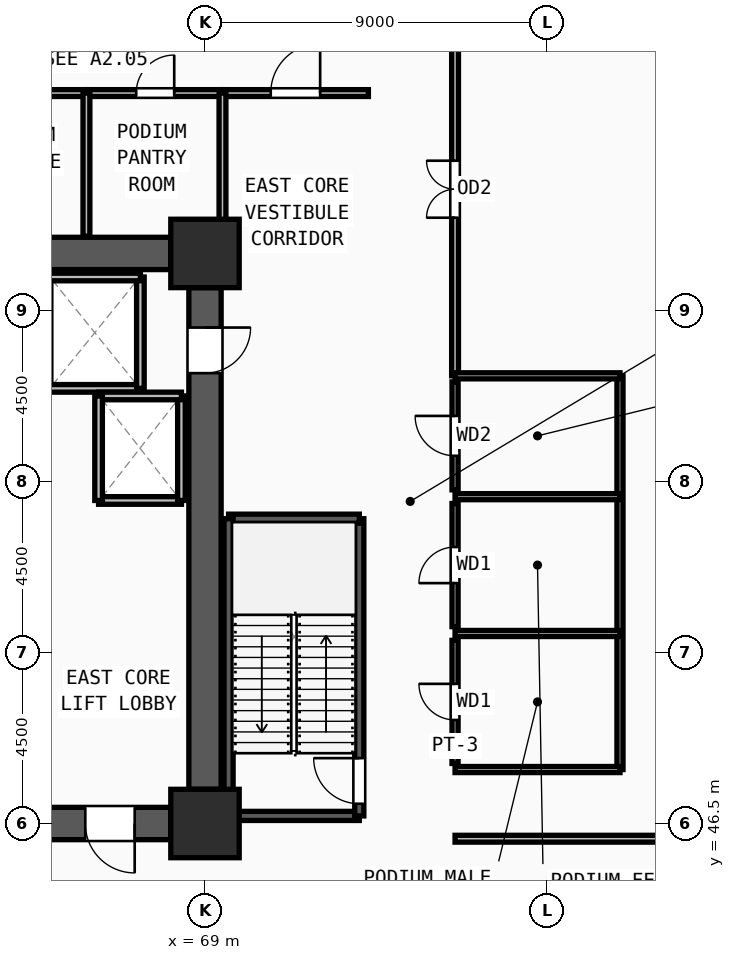
"""IFC4 building model, lengths in metres.
Left out: names, types, materials, properties, quantities, classifications, styles, units other than length and angle.
Written with IfcOpenShell. Run it as: python <this file> out.ifc"""

import sys

from ifc_helpers import new_model, si_unit, direction, frame, frame_2d, origin, origin_2d, place, context, subcontext, project, spatial, rectangle, extrude, source, transform, mapped, element, fill, save


model = new_model("IFC4")
c1 = context("Model", 3, precision=1e-05, world=origin(), true_north=direction((0.0, 1.0)))
c2 = subcontext(c1, "Body", "Model", "MODEL_VIEW")
j1 = project(units=[si_unit("LENGTHUNIT", "METRE"), si_unit("PLANEANGLEUNIT", "RADIAN")], contexts=[c1])
p1 = place(None, origin())
s1 = spatial("IfcSite", under=j1, at=p1, CompositionType="ELEMENT")
p2 = place(p1, origin())
s2 = spatial("IfcBuilding", under=s1, at=p2, CompositionType="ELEMENT")
p3 = place(p2, frame((0.0, 0.0, 18.9)))
s3 = spatial("IfcBuildingStorey", under=s2, at=p3, CompositionType="ELEMENT", Elevation=18.9)
m1 = source(origin(), c2, "Body", "SweptSolid", [
    extrude(rectangle(XDim=1.8, YDim=1.8, at=origin_2d()), origin(), (0.0, 0.0, 1.0), 4.5),
])
for number, where, z_axis, x_axis in (
    (1, (69.0, 46.5, 0.0), (0.0, 0.0, 1.0), (1.0, 0.0, 0.0)),
    (2, (69.0, 61.5, 0.0), (0.0, 0.0, 1.0), (1.0, 0.0, 0.0)),
):
    element("IfcColumn", number, at=place(p3, frame(where, z_axis=z_axis, x_axis=x_axis)), inside=s3, PredefinedType="COLUMN", context=c2, shape_type="MappedRepresentation", body=[
        mapped(m1, transform((0.0, 0.0, 0.0), x_axis=(1.0, 0.0, 0.0), y_axis=(0.0, 1.0, 0.0), z_axis=(0.0, 0.0, 1.0), scale=1.0)),
    ])
p4 = place(p3, frame((60.9, 61.5, 0.0), z_axis=(0.0, 0.0, 1.0), x_axis=(1.0, 0.0, 0.0)))
e3 = element("IfcWall", 3, at=p4, inside=s3, PredefinedType="SHEAR", context=c2, shape_type="SweptSolid", body=[
    extrude(rectangle(XDim=7.2, YDim=0.85, at=frame_2d((3.6, 0.0))), origin(), (0.0, 0.0, 1.0), 3.6),
])
p5 = place(p3, frame((69.0, 60.6, 0.0), z_axis=(0.0, 0.0, 1.0), x_axis=(0.0, -1.0, 0.0)))
e4 = element("IfcWall", 4, at=p5, inside=s3, PredefinedType="SHEAR", context=c2, shape_type="SweptSolid", body=[
    extrude(rectangle(XDim=13.2, YDim=0.85, at=frame_2d((6.6, 0.0))), origin(), (0.0, 0.0, 1.0), 3.6),
])
m2 = source(origin(), c2, "Body", "SweptSolid", [
    extrude(rectangle(XDim=1.2, YDim=2.2, at=frame_2d((0.6, 1.1))), frame((0.0, 0.435, 0.0), z_axis=(0.0, -1.0, 0.0), x_axis=(1.0, 0.0, 0.0)), (0.0, 0.0, 1.0), 0.87),
])
p6 = place(p5, frame((1.05, 0.0, 0.0)))
e5 = element("IfcOpeningElement", 5, at=p6, cuts=e4, PredefinedType="OPENING", context=c2, shape_type="MappedRepresentation", body=[
    mapped(m2, transform((0.0, 0.0, 0.0), x_axis=(1.0, 0.0, 0.0), y_axis=(0.0, 1.0, 0.0), z_axis=(0.0, 0.0, 1.0), scale=1.0)),
])
p7 = place(p3, frame((68.1, 46.5, 0.0), z_axis=(0.0, 0.0, 1.0), x_axis=(-1.0, 0.0, 0.0)))
e6 = element("IfcWall", 6, at=p7, inside=s3, PredefinedType="SHEAR", context=c2, shape_type="SweptSolid", body=[
    extrude(rectangle(XDim=7.2, YDim=0.85, at=frame_2d((3.6, 0.0))), origin(), (0.0, 0.0, 1.0), 3.6),
])
m3 = source(origin(), c2, "Body", "SweptSolid", [
    extrude(rectangle(XDim=1.3, YDim=2.2, at=frame_2d((0.65, 1.1))), frame((0.0, 0.435, 0.0), z_axis=(0.0, -1.0, 0.0), x_axis=(1.0, 0.0, 0.0)), (0.0, 0.0, 1.0), 0.87),
])
p8 = place(p7, frame((0.95, 0.0, 0.0)))
e7 = element("IfcOpeningElement", 7, at=p8, cuts=e6, PredefinedType="OPENING", context=c2, shape_type="MappedRepresentation", body=[
    mapped(m3, transform((0.0, 0.0, 0.0), x_axis=(1.0, 0.0, 0.0), y_axis=(0.0, 1.0, 0.0), z_axis=(0.0, 0.0, 1.0), scale=1.0)),
])
p9 = place(p3, frame((69.62, 46.7, 0.0), z_axis=(0.0, 0.0, 1.0), x_axis=(1.0, 0.0, 0.0)))
e8 = element("IfcWall", 8, at=p9, inside=s3, PredefinedType="SOLIDWALL", context=c2, shape_type="SweptSolid", body=[
    extrude(rectangle(XDim=3.44, YDim=0.24, at=frame_2d((1.72, 0.0))), origin(), (0.0, 0.0, 1.0), 3.6),
])
p10 = place(p3, frame((73.06, 46.7, 0.0), z_axis=(0.0, 0.0, 1.0), x_axis=(0.0, 1.0, 0.0)))
e9 = element("IfcWall", 9, at=p10, inside=s3, PredefinedType="SOLIDWALL", context=c2, shape_type="SweptSolid", body=[
    extrude(rectangle(XDim=7.82, YDim=0.24, at=frame_2d((3.91, 0.0))), origin(), (0.0, 0.0, 1.0), 3.6),
])
m4 = source(origin(), c2, "Body", "SweptSolid", [
    extrude(rectangle(XDim=1.2, YDim=2.2, at=frame_2d((0.6, 1.1))), frame((0.0, 0.13, 0.0), z_axis=(0.0, -1.0, 0.0), x_axis=(1.0, 0.0, 0.0)), (0.0, 0.0, 1.0), 0.26),
])
p11 = place(p10, frame((0.32, 0.0, 0.0)))
e10 = element("IfcOpeningElement", 10, at=p11, cuts=e9, PredefinedType="OPENING", context=c2, shape_type="MappedRepresentation", body=[
    mapped(m4, transform((0.0, 0.0, 0.0), x_axis=(1.0, 0.0, 0.0), y_axis=(0.0, 1.0, 0.0), z_axis=(0.0, 0.0, 1.0), scale=1.0)),
])
p12 = place(p3, frame((73.06, 54.52, 0.0), z_axis=(0.0, 0.0, 1.0), x_axis=(-1.0, 0.0, 0.0)))
e11 = element("IfcWall", 11, at=p12, inside=s3, PredefinedType="SOLIDWALL", context=c2, shape_type="SweptSolid", body=[
    extrude(rectangle(XDim=3.44, YDim=0.24, at=frame_2d((1.72, 0.0))), origin(), (0.0, 0.0, 1.0), 3.6),
])
p13 = place(p3, frame((69.62, 54.52, 0.0), z_axis=(0.0, 0.0, 1.0), x_axis=(0.0, -1.0, 0.0)))
e12 = element("IfcWall", 12, at=p13, inside=s3, PredefinedType="SOLIDWALL", context=c2, shape_type="SweptSolid", body=[
    extrude(rectangle(XDim=7.82, YDim=0.24, at=frame_2d((3.91, 0.0))), origin(), (0.0, 0.0, 1.0), 3.6),
])
p14 = place(p3, frame((64.9, 57.95, 0.0), z_axis=(0.0, 0.0, 1.0), x_axis=(1.0, 0.0, 0.0)))
e13 = element("IfcWall", 13, at=p14, inside=s3, PredefinedType="SOLIDWALL", context=c2, shape_type="SweptSolid", body=[
    extrude(rectangle(XDim=2.4, YDim=0.2, at=frame_2d((1.2, 0.0))), origin(), (0.0, 0.0, 1.0), 3.6),
])
p15 = place(p3, frame((67.3, 57.95, 0.0), z_axis=(0.0, 0.0, 1.0), x_axis=(0.0, 1.0, 0.0)))
e14 = element("IfcWall", 14, at=p15, inside=s3, PredefinedType="SOLIDWALL", context=c2, shape_type="SweptSolid", body=[
    extrude(rectangle(XDim=2.93, YDim=0.2, at=frame_2d((1.465, 0.0))), origin(), (0.0, 0.0, 1.0), 3.6),
])
p16 = place(p3, frame((67.3, 60.88, 0.0), z_axis=(0.0, 0.0, 1.0), x_axis=(-1.0, 0.0, 0.0)))
e15 = element("IfcWall", 15, at=p16, inside=s3, PredefinedType="SOLIDWALL", context=c2, shape_type="SweptSolid", body=[
    extrude(rectangle(XDim=2.4, YDim=0.2, at=frame_2d((1.2, 0.0))), origin(), (0.0, 0.0, 1.0), 3.6),
])
p17 = place(p3, frame((66.2, 55.0, 0.0), z_axis=(0.0, 0.0, 1.0), x_axis=(1.0, 0.0, 0.0)))
e16 = element("IfcWall", 16, at=p17, inside=s3, PredefinedType="SOLIDWALL", context=c2, shape_type="SweptSolid", body=[
    extrude(rectangle(XDim=2.18, YDim=0.2, at=frame_2d((1.09, 0.0))), origin(), (0.0, 0.0, 1.0), 3.6),
])
p18 = place(p3, frame((68.38, 55.0, 0.0), z_axis=(0.0, 0.0, 1.0), x_axis=(0.0, 1.0, 0.0)))
e17 = element("IfcWall", 17, at=p18, inside=s3, PredefinedType="SOLIDWALL", context=c2, shape_type="SweptSolid", body=[
    extrude(rectangle(XDim=2.75, YDim=0.2, at=frame_2d((1.375, 0.0))), origin(), (0.0, 0.0, 1.0), 3.6),
])
p19 = place(p3, frame((68.38, 57.75, 0.0), z_axis=(0.0, 0.0, 1.0), x_axis=(-1.0, 0.0, 0.0)))
e18 = element("IfcWall", 18, at=p19, inside=s3, PredefinedType="SOLIDWALL", context=c2, shape_type="SweptSolid", body=[
    extrude(rectangle(XDim=2.18, YDim=0.2, at=frame_2d((1.09, 0.0))), origin(), (0.0, 0.0, 1.0), 3.6),
])
p20 = place(p3, frame((66.2, 57.75, 0.0), z_axis=(0.0, 0.0, 1.0), x_axis=(0.0, -1.0, 0.0)))
e19 = element("IfcWall", 19, at=p20, inside=s3, PredefinedType="SOLIDWALL", context=c2, shape_type="SweptSolid", body=[
    extrude(rectangle(XDim=2.75, YDim=0.2, at=frame_2d((1.375, 0.0))), origin(), (0.0, 0.0, 1.0), 3.6),
])
p21 = place(p3, frame((75.58, 48.08, 0.0), z_axis=(0.0, 0.0, 1.0), x_axis=(0.0, 1.0, 0.0)))
e20 = element("IfcWall", 20, at=p21, inside=s3, PredefinedType="PARTITIONING", context=c2, shape_type="SweptSolid", body=[
    extrude(rectangle(XDim=3.24, YDim=0.16, at=frame_2d((1.62, 0.0))), origin(), (0.0, 0.0, 1.0), 3.6),
])
m5 = source(origin(), c2, "Body", "SweptSolid", [
    extrude(rectangle(XDim=0.95, YDim=2.15, at=frame_2d((0.475, 1.075))), frame((0.0, 0.09, 0.0), z_axis=(0.0, -1.0, 0.0), x_axis=(1.0, 0.0, 0.0)), (0.0, 0.0, 1.0), 0.18),
])
p22 = place(p21, frame((1.145, 0.0, 0.0)))
e21 = element("IfcOpeningElement", 21, at=p22, cuts=e20, PredefinedType="OPENING", context=c2, shape_type="MappedRepresentation", body=[
    mapped(m5, transform((0.0, 0.0, 0.0), x_axis=(1.0, 0.0, 0.0), y_axis=(0.0, 1.0, 0.0), z_axis=(0.0, 0.0, 1.0), scale=1.0)),
])
p23 = place(p3, frame((75.58, 51.68, 0.0), z_axis=(0.0, 0.0, 1.0), x_axis=(0.0, 1.0, 0.0)))
e22 = element("IfcWall", 22, at=p23, inside=s3, PredefinedType="PARTITIONING", context=c2, shape_type="SweptSolid", body=[
    extrude(rectangle(XDim=3.24, YDim=0.16, at=frame_2d((1.62, 0.0))), origin(), (0.0, 0.0, 1.0), 3.6),
])
p24 = place(p23, frame((1.145, 0.0, 0.0)))
e23 = element("IfcOpeningElement", 23, at=p24, cuts=e22, PredefinedType="OPENING", context=c2, shape_type="MappedRepresentation", body=[
    mapped(m5, transform((0.0, 0.0, 0.0), x_axis=(1.0, 0.0, 0.0), y_axis=(0.0, 1.0, 0.0), z_axis=(0.0, 0.0, 1.0), scale=1.0)),
])
p25 = place(p3, frame((75.58, 55.28, 0.0), z_axis=(0.0, 0.0, 1.0), x_axis=(0.0, 1.0, 0.0)))
e24 = element("IfcWall", 24, at=p25, inside=s3, PredefinedType="PARTITIONING", context=c2, shape_type="SweptSolid", body=[
    extrude(rectangle(XDim=2.84, YDim=0.16, at=frame_2d((1.42, 0.0))), origin(), (0.0, 0.0, 1.0), 3.6),
])
m6 = source(origin(), c2, "Body", "SweptSolid", [
    extrude(rectangle(XDim=1.05, YDim=2.15, at=frame_2d((0.525, 1.075))), frame((0.0, 0.09, 0.0), z_axis=(0.0, -1.0, 0.0), x_axis=(1.0, 0.0, 0.0)), (0.0, 0.0, 1.0), 0.18),
])
p26 = place(p25, frame((0.895, 0.0, 0.0)))
e25 = element("IfcOpeningElement", 25, at=p26, cuts=e24, PredefinedType="OPENING", context=c2, shape_type="MappedRepresentation", body=[
    mapped(m6, transform((0.0, 0.0, 0.0), x_axis=(1.0, 0.0, 0.0), y_axis=(0.0, 1.0, 0.0), z_axis=(0.0, 0.0, 1.0), scale=1.0)),
])
p27 = place(p3, frame((62.39, 65.72, 0.0), z_axis=(0.0, 0.0, 1.0), x_axis=(1.0, 0.0, 0.0)))
e26 = element("IfcWall", 26, at=p27, inside=s3, PredefinedType="PARTITIONING", context=c2, shape_type="SweptSolid", body=[
    extrude(rectangle(XDim=3.49, YDim=0.18, at=frame_2d((1.745, 0.0))), origin(), (0.0, 0.0, 1.0), 3.6),
])
m7 = source(origin(), c2, "Body", "SweptSolid", [
    extrude(rectangle(XDim=1.0, YDim=2.2, at=frame_2d((0.5, 1.1))), frame((0.0, 0.1, 0.0), z_axis=(0.0, -1.0, 0.0), x_axis=(1.0, 0.0, 0.0)), (0.0, 0.0, 1.0), 0.2),
])
p28 = place(p27, frame((1.245, 0.0, 0.0)))
e27 = element("IfcOpeningElement", 27, at=p28, cuts=e26, PredefinedType="OPENING", context=c2, shape_type="MappedRepresentation", body=[
    mapped(m7, transform((0.0, 0.0, 0.0), x_axis=(1.0, 0.0, 0.0), y_axis=(0.0, 1.0, 0.0), z_axis=(0.0, 0.0, 1.0), scale=1.0)),
])
p29 = place(p3, frame((65.92, 65.72, 0.0), z_axis=(0.0, 0.0, 1.0), x_axis=(1.0, 0.0, 0.0)))
e28 = element("IfcWall", 28, at=p29, inside=s3, PredefinedType="PARTITIONING", context=c2, shape_type="SweptSolid", body=[
    extrude(rectangle(XDim=3.54, YDim=0.18, at=frame_2d((1.77, 0.0))), origin(), (0.0, 0.0, 1.0), 3.6),
])
p30 = place(p29, frame((1.27, 0.0, 0.0)))
e29 = element("IfcOpeningElement", 29, at=p30, cuts=e28, PredefinedType="OPENING", context=c2, shape_type="MappedRepresentation", body=[
    mapped(m7, transform((0.0, 0.0, 0.0), x_axis=(1.0, 0.0, 0.0), y_axis=(0.0, 1.0, 0.0), z_axis=(0.0, 0.0, 1.0), scale=1.0)),
])
p31 = place(p3, frame((69.46, 65.72, 0.0), z_axis=(0.0, 0.0, 1.0), x_axis=(1.0, 0.0, 0.0)))
e30 = element("IfcWall", 30, at=p31, inside=s3, PredefinedType="PARTITIONING", context=c2, shape_type="SweptSolid", body=[
    extrude(rectangle(XDim=3.84, YDim=0.18, at=frame_2d((1.92, 0.0))), origin(), (0.0, 0.0, 1.0), 3.6),
])
m8 = source(origin(), c2, "Body", "SweptSolid", [
    extrude(rectangle(XDim=1.3, YDim=2.2, at=frame_2d((0.65, 1.1))), frame((0.0, 0.1, 0.0), z_axis=(0.0, -1.0, 0.0), x_axis=(1.0, 0.0, 0.0)), (0.0, 0.0, 1.0), 0.2),
])
p32 = place(p31, frame((1.27, 0.0, 0.0)))
e31 = element("IfcOpeningElement", 31, at=p32, cuts=e30, PredefinedType="OPENING", context=c2, shape_type="MappedRepresentation", body=[
    mapped(m8, transform((0.0, 0.0, 0.0), x_axis=(1.0, 0.0, 0.0), y_axis=(0.0, 1.0, 0.0), z_axis=(0.0, 0.0, 1.0), scale=1.0)),
])
p33 = place(p3, frame((75.58, 58.28, 0.0), z_axis=(0.0, 0.0, 1.0), x_axis=(0.0, 1.0, 0.0)))
e32 = element("IfcWall", 32, at=p33, inside=s3, PredefinedType="PARTITIONING", context=c2, shape_type="SweptSolid", body=[
    extrude(rectangle(XDim=9.82, YDim=0.18, at=frame_2d((4.91, 0.0))), origin(), (0.0, 0.0, 1.0), 3.6),
])
m9 = source(origin(), c2, "Body", "SweptSolid", [
    extrude(rectangle(XDim=1.5, YDim=2.2, at=frame_2d((0.75, 1.1))), frame((0.0, 0.1, 0.0), z_axis=(0.0, -1.0, 0.0), x_axis=(1.0, 0.0, 0.0)), (0.0, 0.0, 1.0), 0.2),
])
p34 = place(p33, frame((4.16, 0.0, 0.0)))
e33 = element("IfcOpeningElement", 33, at=p34, cuts=e32, PredefinedType="OPENING", context=c2, shape_type="MappedRepresentation", body=[
    mapped(m9, transform((0.0, 0.0, 0.0), x_axis=(1.0, 0.0, 0.0), y_axis=(0.0, 1.0, 0.0), z_axis=(0.0, 0.0, 1.0), scale=1.0)),
])
p35 = place(p3, frame((79.92, 47.92, 0.0), z_axis=(0.0, 0.0, 1.0), x_axis=(0.0, 1.0, 0.0)))
e34 = element("IfcWall", 34, at=p35, inside=s3, PredefinedType="PARTITIONING", context=c2, shape_type="SweptSolid", body=[
    extrude(rectangle(XDim=10.36, YDim=0.16, at=frame_2d((5.18, 0.0))), origin(), (0.0, 0.0, 1.0), 3.6),
])
for number, where, z_axis, x_axis in (
    (35, (75.58, 47.92, 0.0), (0.0, 0.0, 1.0), (1.0, 0.0, 0.0)),
    (36, (75.58, 51.5, 0.0), (0.0, 0.0, 1.0), (1.0, 0.0, 0.0)),
    (37, (75.58, 55.1, 0.0), (0.0, 0.0, 1.0), (1.0, 0.0, 0.0)),
    (38, (75.58, 58.28, 0.0), (0.0, 0.0, 1.0), (1.0, 0.0, 0.0)),
):
    element("IfcWall", number, at=place(p3, frame(where, z_axis=z_axis, x_axis=x_axis)), inside=s3, PredefinedType="PARTITIONING", context=c2, shape_type="SweptSolid", body=[
        extrude(rectangle(XDim=4.34, YDim=0.16, at=frame_2d((2.17, 0.0))), origin(), (0.0, 0.0, 1.0), 3.6),
    ])
p36 = place(p3, frame((75.58, 46.1, 0.0), z_axis=(0.0, 0.0, 1.0), x_axis=(1.0, 0.0, 0.0)))
e39 = element("IfcWall", 39, at=p36, inside=s3, PredefinedType="PARTITIONING", context=c2, shape_type="SweptSolid", body=[
    extrude(rectangle(XDim=20.795, YDim=0.18, at=frame_2d((10.397, 0.0))), origin(), (0.0, 0.0, 1.0), 3.6),
])
for number, where, z_axis, x_axis in (
    (40, (65.88, 61.95, 0.0), (0.0, 0.0, 1.0), (0.0, 1.0, 0.0)),
    (41, (69.46, 61.95, 0.0), (0.0, 0.0, 1.0), (0.0, 1.0, 0.0)),
):
    element("IfcWall", number, at=place(p3, frame(where, z_axis=z_axis, x_axis=x_axis)), inside=s3, PredefinedType="PARTITIONING", context=c2, shape_type="SweptSolid", body=[
        extrude(rectangle(XDim=3.77, YDim=0.18, at=frame_2d((1.885, 0.0))), origin(), (0.0, 0.0, 1.0), 3.6),
    ])
m10 = source(origin(), c2, "Body", "SweptSolid", [
    extrude(rectangle(XDim=1.3, YDim=2.2, at=frame_2d((0.65, 1.1))), frame((0.0, 0.025, 0.0), z_axis=(0.0, -1.0, 0.0), x_axis=(1.0, 0.0, 0.0)), (0.0, 0.0, 1.0), 0.05),
])
p37 = place(p8, origin())
e42 = element("IfcDoor", 42, at=p37, inside=s3, OperationType="SINGLE_SWING_LEFT", PredefinedType="DOOR", context=c2, shape_type="MappedRepresentation", body=[
    mapped(m10, transform((0.0, 0.0, 0.0), x_axis=(1.0, 0.0, 0.0), y_axis=(0.0, 1.0, 0.0), z_axis=(0.0, 0.0, 1.0), scale=1.0)),
])
fill(e7, e42)
m11 = source(origin(), c2, "Body", "SweptSolid", [
    extrude(rectangle(XDim=1.2, YDim=2.2, at=frame_2d((0.6, 1.1))), frame((0.0, 0.025, 0.0), z_axis=(0.0, -1.0, 0.0), x_axis=(1.0, 0.0, 0.0)), (0.0, 0.0, 1.0), 0.05),
])
p38 = place(p6, origin())
e43 = element("IfcDoor", 43, at=p38, inside=s3, OperationType="SINGLE_SWING_LEFT", PredefinedType="DOOR", context=c2, shape_type="MappedRepresentation", body=[
    mapped(m11, transform((0.0, 0.0, 0.0), x_axis=(1.0, 0.0, 0.0), y_axis=(0.0, 1.0, 0.0), z_axis=(0.0, 0.0, 1.0), scale=1.0)),
])
fill(e5, e43)
p39 = place(p11, origin())
e44 = element("IfcDoor", 44, at=p39, inside=s3, OperationType="SINGLE_SWING_RIGHT", PredefinedType="DOOR", context=c2, shape_type="MappedRepresentation", body=[
    mapped(m11, transform((0.0, 0.0, 0.0), x_axis=(1.0, 0.0, 0.0), y_axis=(0.0, 1.0, 0.0), z_axis=(0.0, 0.0, 1.0), scale=1.0)),
])
fill(e10, e44)
m12 = source(origin(), c2, "Body", "SweptSolid", [
    extrude(rectangle(XDim=0.95, YDim=2.15, at=frame_2d((0.475, 1.075))), frame((0.0, 0.025, 0.0), z_axis=(0.0, -1.0, 0.0), x_axis=(1.0, 0.0, 0.0)), (0.0, 0.0, 1.0), 0.05),
])
p40 = place(p22, origin())
e45 = element("IfcDoor", 45, at=p40, inside=s3, OperationType="SINGLE_SWING_RIGHT", PredefinedType="DOOR", context=c2, shape_type="MappedRepresentation", body=[
    mapped(m12, transform((0.0, 0.0, 0.0), x_axis=(1.0, 0.0, 0.0), y_axis=(0.0, 1.0, 0.0), z_axis=(0.0, 0.0, 1.0), scale=1.0)),
])
fill(e21, e45)
p41 = place(p24, origin())
e46 = element("IfcDoor", 46, at=p41, inside=s3, OperationType="SINGLE_SWING_LEFT", PredefinedType="DOOR", context=c2, shape_type="MappedRepresentation", body=[
    mapped(m12, transform((0.0, 0.0, 0.0), x_axis=(1.0, 0.0, 0.0), y_axis=(0.0, 1.0, 0.0), z_axis=(0.0, 0.0, 1.0), scale=1.0)),
])
fill(e23, e46)
m13 = source(origin(), c2, "Body", "SweptSolid", [
    extrude(rectangle(XDim=1.05, YDim=2.15, at=frame_2d((0.525, 1.075))), frame((0.0, 0.025, 0.0), z_axis=(0.0, -1.0, 0.0), x_axis=(1.0, 0.0, 0.0)), (0.0, 0.0, 1.0), 0.05),
])
p42 = place(p26, origin())
e47 = element("IfcDoor", 47, at=p42, inside=s3, OperationType="SINGLE_SWING_RIGHT", PredefinedType="DOOR", context=c2, shape_type="MappedRepresentation", body=[
    mapped(m13, transform((0.0, 0.0, 0.0), x_axis=(1.0, 0.0, 0.0), y_axis=(0.0, 1.0, 0.0), z_axis=(0.0, 0.0, 1.0), scale=1.0)),
])
fill(e25, e47)
m14 = source(origin(), c2, "Body", "SweptSolid", [
    extrude(rectangle(XDim=1.0, YDim=2.2, at=frame_2d((0.5, 1.1))), frame((0.0, 0.025, 0.0), z_axis=(0.0, -1.0, 0.0), x_axis=(1.0, 0.0, 0.0)), (0.0, 0.0, 1.0), 0.05),
])
p43 = place(p30, origin())
e48 = element("IfcDoor", 48, at=p43, inside=s3, OperationType="SINGLE_SWING_RIGHT", PredefinedType="DOOR", context=c2, shape_type="MappedRepresentation", body=[
    mapped(m14, transform((0.0, 0.0, 0.0), x_axis=(1.0, 0.0, 0.0), y_axis=(0.0, 1.0, 0.0), z_axis=(0.0, 0.0, 1.0), scale=1.0)),
])
fill(e29, e48)
p44 = place(p32, origin())
e49 = element("IfcDoor", 49, at=p44, inside=s3, OperationType="SINGLE_SWING_RIGHT", PredefinedType="DOOR", context=c2, shape_type="MappedRepresentation", body=[
    mapped(m10, transform((0.0, 0.0, 0.0), x_axis=(1.0, 0.0, 0.0), y_axis=(0.0, 1.0, 0.0), z_axis=(0.0, 0.0, 1.0), scale=1.0)),
])
fill(e31, e49)
m15 = source(origin(), c2, "Body", "SweptSolid", [
    extrude(rectangle(XDim=1.5, YDim=2.2, at=frame_2d((0.75, 1.1))), frame((0.0, 0.025, 0.0), z_axis=(0.0, -1.0, 0.0), x_axis=(1.0, 0.0, 0.0)), (0.0, 0.0, 1.0), 0.05),
])
p45 = place(p34, origin())
e50 = element("IfcDoor", 50, at=p45, inside=s3, OperationType="DOUBLE_DOOR_SINGLE_SWING", PredefinedType="DOOR", context=c2, shape_type="MappedRepresentation", body=[
    mapped(m15, transform((0.0, 0.0, 0.0), x_axis=(1.0, 0.0, 0.0), y_axis=(0.0, 1.0, 0.0), z_axis=(0.0, 0.0, 1.0), scale=1.0)),
])
fill(e33, e50)
save(model, sys.argv[1])
